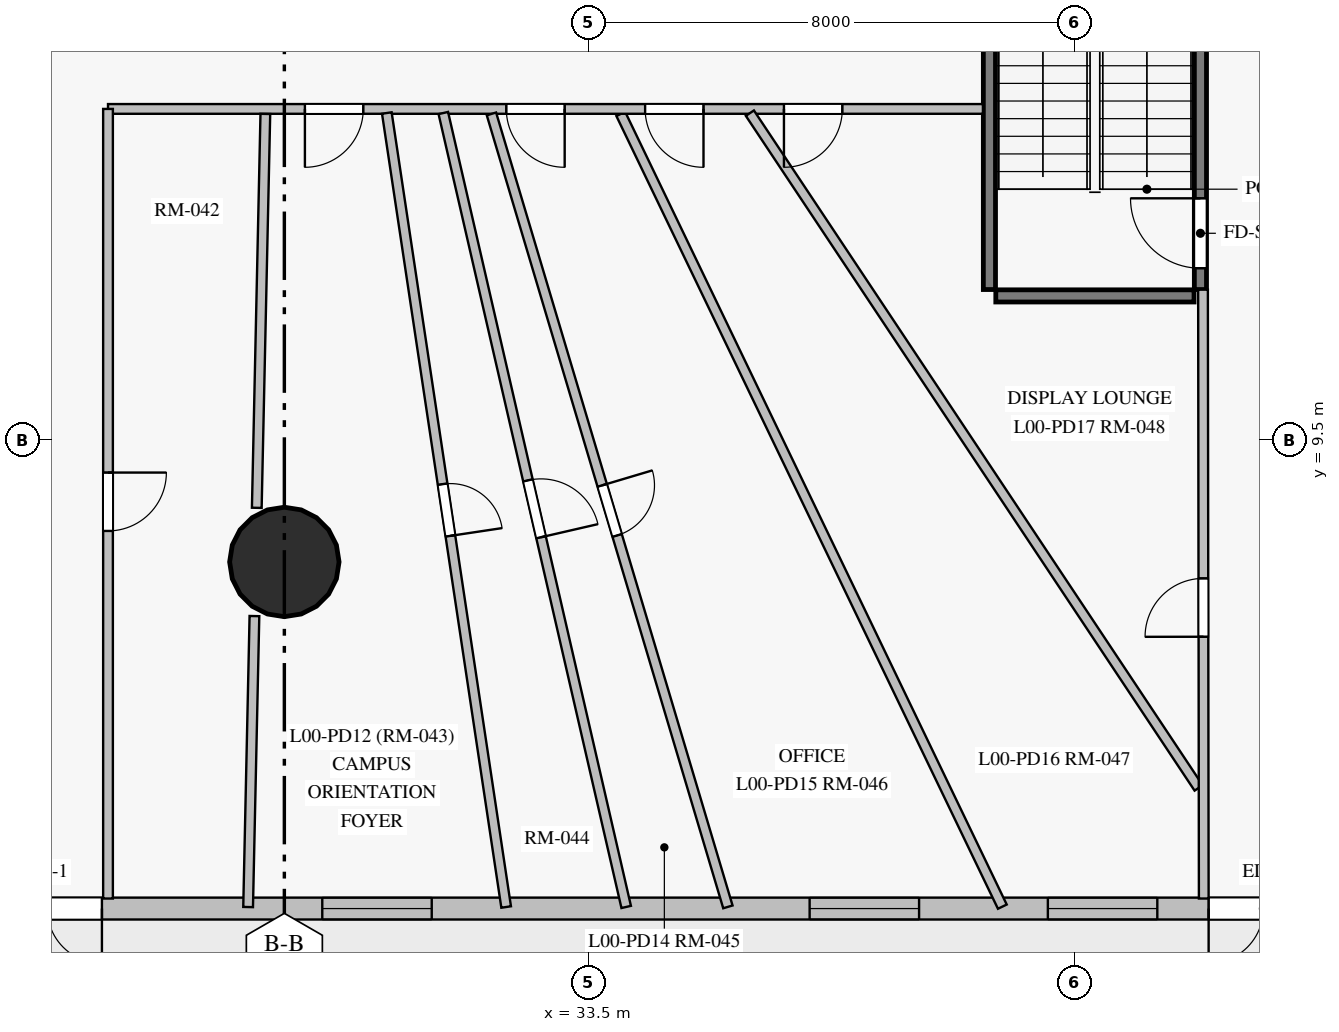
"""IFC4 building model, lengths in metres.
Left out: names, types, materials, properties, quantities, classifications, styles, units other than length and angle.
Written with IfcOpenShell. Run it as: python <this file> out.ifc"""

import sys

from ifc_helpers import new_model, si_unit, direction, frame, frame_2d, origin, origin_with_axes, origin_2d, place, context, subcontext, project, spatial, rectangle, circle, extrude, source, transform, mapped, element, fill, save


model = new_model("IFC4")
c1 = context("Model", 3, precision=1e-05, world=origin(), true_north=direction((0.0, 1.0)))
c2 = subcontext(c1, "Body", "Model", "MODEL_VIEW")
j1 = project(units=[si_unit("LENGTHUNIT", "METRE"), si_unit("PLANEANGLEUNIT", "RADIAN")], contexts=[c1])
p1 = place(None, origin())
s1 = spatial("IfcSite", under=j1, at=p1, CompositionType="ELEMENT")
p2 = place(p1, origin())
s2 = spatial("IfcBuilding", under=s1, at=p2, CompositionType="ELEMENT")
p3 = place(p2, origin())
s3 = spatial("IfcBuildingStorey", under=s2, at=p3, CompositionType="ELEMENT", Elevation=0.0)
m1 = source(origin_with_axes(), c2, "Body", "SweptSolid", [
    extrude(circle(Radius=0.9, at=origin_2d()), origin(), (0.0, 0.0, 1.0), 4.5),
])
p4 = place(p3, frame((28.5, 7.5, 0.0), z_axis=(0.0, 0.0, 1.0), x_axis=(1.0, 0.0, 0.0)))
e1 = element("IfcColumn", 1, at=p4, inside=s3, PredefinedType="COLUMN", context=c2, shape_type="MappedRepresentation", body=[
    mapped(m1, transform((0.0, 0.0, 0.0), scale=1.0)),
])
p5 = place(p3, frame((56.1, 1.8, 0.0), z_axis=(0.0, 0.0, 1.0), x_axis=(-1.0, 0.0, 0.0)))
e2 = element("IfcWall", 2, at=p5, inside=s3, PredefinedType="SOLIDWALL", context=c2, shape_type="SweptSolid", body=[
    extrude(rectangle(XDim=54.6, YDim=0.36, at=frame_2d((27.3, 0.0))), origin(), (0.0, 0.0, 1.0), 4.2),
])
p6 = place(p5, frame((51.547, 0.0, 0.85)))
e3 = element("IfcOpeningElement", 3, at=p6, cuts=e2, PredefinedType="OPENING", context=c2, shape_type="SweptSolid", body=[
    extrude(rectangle(XDim=1.8, YDim=2.2, at=frame_2d((0.9, 1.1))), frame((0.0, 0.19, 0.0), z_axis=(0.0, -1.0, 0.0), x_axis=(1.0, 0.0, 0.0)), (0.0, 0.0, 1.0), 0.38),
])
p7 = place(p5, frame((47.014, 0.0, 0.85)))
e4 = element("IfcOpeningElement", 4, at=p7, cuts=e2, PredefinedType="OPENING", context=c2, shape_type="SweptSolid", body=[
    extrude(rectangle(XDim=1.8, YDim=2.2, at=frame_2d((0.9, 1.1))), frame((0.0, 0.19, 0.0), z_axis=(0.0, -1.0, 0.0), x_axis=(1.0, 0.0, 0.0)), (0.0, 0.0, 1.0), 0.38),
])
p8 = place(p5, frame((42.49, 0.0, 0.85)))
e5 = element("IfcOpeningElement", 5, at=p8, cuts=e2, PredefinedType="OPENING", context=c2, shape_type="SweptSolid", body=[
    extrude(rectangle(XDim=1.8, YDim=2.2, at=frame_2d((0.9, 1.1))), frame((0.0, 0.19, 0.0), z_axis=(0.0, -1.0, 0.0), x_axis=(1.0, 0.0, 0.0)), (0.0, 0.0, 1.0), 0.38),
])
p9 = place(p5, frame((37.288, 0.0, 0.85)))
e6 = element("IfcOpeningElement", 6, at=p9, cuts=e2, PredefinedType="OPENING", context=c2, shape_type="SweptSolid", body=[
    extrude(rectangle(XDim=1.8, YDim=2.2, at=frame_2d((0.9, 1.1))), frame((0.0, 0.19, 0.0), z_axis=(0.0, -1.0, 0.0), x_axis=(1.0, 0.0, 0.0)), (0.0, 0.0, 1.0), 0.38),
])
p10 = place(p5, frame((25.176, 0.0, 0.85)))
e7 = element("IfcOpeningElement", 7, at=p10, cuts=e2, PredefinedType="OPENING", context=c2, shape_type="SweptSolid", body=[
    extrude(rectangle(XDim=1.8, YDim=2.2, at=frame_2d((0.9, 1.1))), frame((0.0, 0.19, 0.0), z_axis=(0.0, -1.0, 0.0), x_axis=(1.0, 0.0, 0.0)), (0.0, 0.0, 1.0), 0.38),
])
p11 = place(p5, frame((17.162, 0.0, 0.85)))
e8 = element("IfcOpeningElement", 8, at=p11, cuts=e2, PredefinedType="OPENING", context=c2, shape_type="SweptSolid", body=[
    extrude(rectangle(XDim=1.8, YDim=2.2, at=frame_2d((0.9, 1.1))), frame((0.0, 0.19, 0.0), z_axis=(0.0, -1.0, 0.0), x_axis=(1.0, 0.0, 0.0)), (0.0, 0.0, 1.0), 0.38),
])
p12 = place(p5, frame((13.244, 0.0, 0.85)))
e9 = element("IfcOpeningElement", 9, at=p12, cuts=e2, PredefinedType="OPENING", context=c2, shape_type="SweptSolid", body=[
    extrude(rectangle(XDim=1.8, YDim=2.2, at=frame_2d((0.9, 1.1))), frame((0.0, 0.19, 0.0), z_axis=(0.0, -1.0, 0.0), x_axis=(1.0, 0.0, 0.0)), (0.0, 0.0, 1.0), 0.38),
])
p13 = place(p5, frame((6.25, 0.0, 0.85)))
e10 = element("IfcOpeningElement", 10, at=p13, cuts=e2, PredefinedType="OPENING", context=c2, shape_type="SweptSolid", body=[
    extrude(rectangle(XDim=1.8, YDim=2.2, at=frame_2d((0.9, 1.1))), frame((0.0, 0.19, 0.0), z_axis=(0.0, -1.0, 0.0), x_axis=(1.0, 0.0, 0.0)), (0.0, 0.0, 1.0), 0.38),
])
p14 = place(p5, frame((1.48, 0.0, 0.85)))
e11 = element("IfcOpeningElement", 11, at=p14, cuts=e2, PredefinedType="OPENING", context=c2, shape_type="SweptSolid", body=[
    extrude(rectangle(XDim=1.8, YDim=2.2, at=frame_2d((0.9, 1.1))), frame((0.0, 0.19, 0.0), z_axis=(0.0, -1.0, 0.0), x_axis=(1.0, 0.0, 0.0)), (0.0, 0.0, 1.0), 0.38),
])
p15 = place(p5, frame((33.2, 0.0, 0.0)))
e12 = element("IfcOpeningElement", 12, at=p15, cuts=e2, PredefinedType="OPENING", context=c2, shape_type="SweptSolid", body=[
    extrude(rectangle(XDim=1.8, YDim=2.3, at=frame_2d((0.9, 1.15))), frame((0.0, 0.19, 0.0), z_axis=(0.0, -1.0, 0.0), x_axis=(1.0, 0.0, 0.0)), (0.0, 0.0, 1.0), 0.38),
])
p16 = place(p5, frame((30.6, 0.0, 0.0)))
e13 = element("IfcOpeningElement", 13, at=p16, cuts=e2, PredefinedType="OPENING", context=c2, shape_type="SweptSolid", body=[
    extrude(rectangle(XDim=1.8, YDim=2.3, at=frame_2d((0.9, 1.15))), frame((0.0, 0.19, 0.0), z_axis=(0.0, -1.0, 0.0), x_axis=(1.0, 0.0, 0.0)), (0.0, 0.0, 1.0), 0.38),
])
p17 = place(p5, frame((10.6, 0.0, 0.0)))
e14 = element("IfcOpeningElement", 14, at=p17, cuts=e2, PredefinedType="OPENING", context=c2, shape_type="SweptSolid", body=[
    extrude(rectangle(XDim=1.8, YDim=2.3, at=frame_2d((0.9, 1.15))), frame((0.0, 0.19, 0.0), z_axis=(0.0, -1.0, 0.0), x_axis=(1.0, 0.0, 0.0)), (0.0, 0.0, 1.0), 0.38),
])
p18 = place(p3, frame((40.095, 11.98, 0.0), z_axis=(0.0, 0.0, 1.0), x_axis=(0.0, 1.0, 0.0)))
e15 = element("IfcWall", 15, at=p18, inside=s3, PredefinedType="SHEAR", context=c2, shape_type="SweptSolid", body=[
    extrude(rectangle(XDim=7.35, YDim=0.2, at=frame_2d((3.675, 0.0))), origin(), (0.0, 0.0, 1.0), 4.2),
])
p19 = place(p3, frame((43.565, 11.98, 0.0), z_axis=(0.0, 0.0, 1.0), x_axis=(0.0, 1.0, 0.0)))
e16 = element("IfcWall", 16, at=p19, inside=s3, PredefinedType="SHEAR", context=c2, shape_type="SweptSolid", body=[
    extrude(rectangle(XDim=7.35, YDim=0.2, at=frame_2d((3.675, 0.0))), origin(), (0.0, 0.0, 1.0), 4.2),
])
p20 = place(p19, frame((0.35, 0.0, 0.0)))
e17 = element("IfcOpeningElement", 17, at=p20, cuts=e16, PredefinedType="OPENING", context=c2, shape_type="SweptSolid", body=[
    extrude(rectangle(XDim=1.15, YDim=2.15, at=frame_2d((0.575, 1.075))), frame((0.0, 0.11, 0.0), z_axis=(0.0, -1.0, 0.0), x_axis=(1.0, 0.0, 0.0)), (0.0, 0.0, 1.0), 0.22),
])
p21 = place(p3, frame((40.2, 11.875, 0.0), z_axis=(0.0, 0.0, 1.0), x_axis=(1.0, 0.0, 0.0)))
e18 = element("IfcWall", 18, at=p21, inside=s3, PredefinedType="SHEAR", context=c2, shape_type="SweptSolid", body=[
    extrude(rectangle(XDim=3.26, YDim=0.2, at=frame_2d((1.63, 0.0))), origin(), (0.0, 0.0, 1.0), 4.2),
])
p22 = place(p3, frame((40.932, 21.274, 0.0), z_axis=(0.0, 0.0, 1.0), x_axis=(0.923573591062, -0.383421206889, 0.0)))
e19 = element("IfcWall", 19, at=p22, inside=s3, PredefinedType="PARTITIONING", context=c2, shape_type="SweptSolid", body=[
    extrude(rectangle(XDim=17.149, YDim=0.16, at=frame_2d((8.574, 0.0))), origin(), (0.0, 0.0, 1.0), 4.2),
])
p23 = place(p22, frame((8.082, 0.0, 0.0)))
e20 = element("IfcOpeningElement", 20, at=p23, cuts=e19, PredefinedType="OPENING", context=c2, shape_type="SweptSolid", body=[
    extrude(rectangle(XDim=0.96, YDim=2.15, at=frame_2d((0.48, 1.075))), frame((0.0, 0.09, 0.0), z_axis=(0.0, -1.0, 0.0), x_axis=(1.0, 0.0, 0.0)), (0.0, 0.0, 1.0), 0.18),
])
p24 = place(p3, frame((34.032, 14.868, 0.0), z_axis=(0.0, 0.0, 1.0), x_axis=(0.433724291506, -0.901045636445, 0.0)))
e21 = element("IfcWall", 21, at=p24, inside=s3, PredefinedType="PARTITIONING", context=c2, shape_type="SweptSolid", body=[
    extrude(rectangle(XDim=14.468, YDim=0.16, at=frame_2d((7.234, 0.0))), origin(), (0.0, 0.0, 1.0), 4.2),
])
p25 = place(p3, frame((39.988, 14.95, 0.0), z_axis=(0.0, 0.0, 1.0), x_axis=(-1.0, 0.0, 0.0)))
e22 = element("IfcWall", 22, at=p25, inside=s3, PredefinedType="PARTITIONING", context=c2, shape_type="SweptSolid", body=[
    extrude(rectangle(XDim=14.388, YDim=0.16, at=frame_2d((7.194, 0.0))), origin(), (0.0, 0.0, 1.0), 4.2),
])
p26 = place(p25, frame((10.19, 0.0, 0.0)))
e23 = element("IfcOpeningElement", 23, at=p26, cuts=e22, PredefinedType="OPENING", context=c2, shape_type="SweptSolid", body=[
    extrude(rectangle(XDim=0.96, YDim=2.15, at=frame_2d((0.48, 1.075))), frame((0.0, 0.09, 0.0), z_axis=(0.0, -1.0, 0.0), x_axis=(1.0, 0.0, 0.0)), (0.0, 0.0, 1.0), 0.18),
])
p27 = place(p25, frame((6.878, 0.0, 0.0)))
e24 = element("IfcOpeningElement", 24, at=p27, cuts=e22, PredefinedType="OPENING", context=c2, shape_type="SweptSolid", body=[
    extrude(rectangle(XDim=0.96, YDim=2.15, at=frame_2d((0.48, 1.075))), frame((0.0, 0.09, 0.0), z_axis=(0.0, -1.0, 0.0), x_axis=(1.0, 0.0, 0.0)), (0.0, 0.0, 1.0), 0.18),
])
p28 = place(p25, frame((4.595, 0.0, 0.0)))
e25 = element("IfcOpeningElement", 25, at=p28, cuts=e22, PredefinedType="OPENING", context=c2, shape_type="SweptSolid", body=[
    extrude(rectangle(XDim=0.96, YDim=2.15, at=frame_2d((0.48, 1.075))), frame((0.0, 0.09, 0.0), z_axis=(0.0, -1.0, 0.0), x_axis=(1.0, 0.0, 0.0)), (0.0, 0.0, 1.0), 0.18),
])
p29 = place(p25, frame((2.312, 0.0, 0.0)))
e26 = element("IfcOpeningElement", 26, at=p29, cuts=e22, PredefinedType="OPENING", context=c2, shape_type="SweptSolid", body=[
    extrude(rectangle(XDim=0.96, YDim=2.15, at=frame_2d((0.48, 1.075))), frame((0.0, 0.09, 0.0), z_axis=(0.0, -1.0, 0.0), x_axis=(1.0, 0.0, 0.0)), (0.0, 0.0, 1.0), 0.18),
])
p30 = place(p3, frame((31.906, 14.868, 0.0), z_axis=(0.0, 0.0, 1.0), x_axis=(0.285757427195, -0.958301984138, 0.0)))
e27 = element("IfcWall", 27, at=p30, inside=s3, PredefinedType="PARTITIONING", context=c2, shape_type="SweptSolid", body=[
    extrude(rectangle(XDim=13.607, YDim=0.16, at=frame_2d((6.804, 0.0))), origin(), (0.0, 0.0, 1.0), 4.2),
])
p31 = place(p30, frame((6.374, 0.0, 0.0)))
e28 = element("IfcOpeningElement", 28, at=p31, cuts=e27, PredefinedType="OPENING", context=c2, shape_type="SweptSolid", body=[
    extrude(rectangle(XDim=0.86, YDim=2.04, at=frame_2d((0.43, 1.02))), frame((0.0, 0.09, 0.0), z_axis=(0.0, -1.0, 0.0), x_axis=(1.0, 0.0, 0.0)), (0.0, 0.0, 1.0), 0.18),
])
p32 = place(p3, frame((31.114, 14.883, 0.0), z_axis=(0.0, 0.0, 1.0), x_axis=(0.22446422468, -0.974482330183, 0.0)))
e29 = element("IfcWall", 29, at=p32, inside=s3, PredefinedType="PARTITIONING", context=c2, shape_type="SweptSolid", body=[
    extrude(rectangle(XDim=13.398, YDim=0.16, at=frame_2d((6.699, 0.0))), origin(), (0.0, 0.0, 1.0), 4.2),
])
p33 = place(p32, frame((6.199, 0.0, 0.0)))
e30 = element("IfcOpeningElement", 30, at=p33, cuts=e29, PredefinedType="OPENING", context=c2, shape_type="SweptSolid", body=[
    extrude(rectangle(XDim=0.96, YDim=2.15, at=frame_2d((0.48, 1.075))), frame((0.0, 0.09, 0.0), z_axis=(0.0, -1.0, 0.0), x_axis=(1.0, 0.0, 0.0)), (0.0, 0.0, 1.0), 0.18),
])
p34 = place(p3, frame((36.156, 14.881, 0.0), z_axis=(0.0, 0.0, 1.0), x_axis=(0.553761322164, -0.832675445822, 0.0)))
e31 = element("IfcWall", 31, at=p34, inside=s3, PredefinedType="PARTITIONING", context=c2, shape_type="SweptSolid", body=[
    extrude(rectangle(XDim=13.327, YDim=0.16, at=frame_2d((6.664, 0.0))), origin(), (0.0, 0.0, 1.0), 4.2),
])
p35 = place(p3, frame((30.185, 14.883, 0.0), z_axis=(0.0, 0.0, 1.0), x_axis=(0.148624355267, -0.988893725848, 0.0)))
e32 = element("IfcWall", 32, at=p35, inside=s3, PredefinedType="PARTITIONING", context=c2, shape_type="SweptSolid", body=[
    extrude(rectangle(XDim=13.204, YDim=0.16, at=frame_2d((6.602, 0.0))), origin(), (0.0, 0.0, 1.0), 4.2),
])
p36 = place(p35, frame((6.172, 0.0, 0.0)))
e33 = element("IfcOpeningElement", 33, at=p36, cuts=e32, PredefinedType="OPENING", context=c2, shape_type="SweptSolid", body=[
    extrude(rectangle(XDim=0.86, YDim=2.04, at=frame_2d((0.43, 1.02))), frame((0.0, 0.09, 0.0), z_axis=(0.0, -1.0, 0.0), x_axis=(1.0, 0.0, 0.0)), (0.0, 0.0, 1.0), 0.18),
])
p37 = place(p3, frame((25.6, 14.95, 0.0), z_axis=(0.0, 0.0, 1.0), x_axis=(0.0, -1.0, 0.0)))
e34 = element("IfcWall", 34, at=p37, inside=s3, PredefinedType="PARTITIONING", context=c2, shape_type="SweptSolid", body=[
    extrude(rectangle(XDim=12.985, YDim=0.16, at=frame_2d((6.492, 0.0))), origin(), (0.0, 0.0, 1.0), 4.2),
])
p38 = place(p37, frame((5.98, 0.0, 0.0)))
e35 = element("IfcOpeningElement", 35, at=p38, cuts=e34, PredefinedType="OPENING", context=c2, shape_type="SweptSolid", body=[
    extrude(rectangle(XDim=0.96, YDim=2.15, at=frame_2d((0.48, 1.075))), frame((0.0, 0.09, 0.0), z_axis=(0.0, -1.0, 0.0), x_axis=(1.0, 0.0, 0.0)), (0.0, 0.0, 1.0), 0.18),
])
p39 = place(p3, frame((43.62, 1.965, 0.0), z_axis=(0.0, 0.0, 1.0), x_axis=(-0.001219154463, 0.999999256831, 0.0)))
e36 = element("IfcWall", 36, at=p39, inside=s3, PredefinedType="PARTITIONING", context=c2, shape_type="SweptSolid", body=[
    extrude(rectangle(XDim=10.013, YDim=0.16, at=frame_2d((5.006, 0.0))), origin(), (0.0, 0.0, 1.0), 4.2),
])
p40 = place(p39, frame((4.305, 0.0, 0.0)))
e37 = element("IfcOpeningElement", 37, at=p40, cuts=e36, PredefinedType="OPENING", context=c2, shape_type="SweptSolid", body=[
    extrude(rectangle(XDim=0.96, YDim=2.15, at=frame_2d((0.48, 1.075))), frame((0.0, 0.09, 0.0), z_axis=(0.0, -1.0, 0.0), x_axis=(1.0, 0.0, 0.0)), (0.0, 0.0, 1.0), 0.18),
])
p41 = place(p3, frame((28.188, 14.868, 0.0), z_axis=(0.0, 0.0, 1.0), x_axis=(-0.021740545111, -0.999763646418, 0.0)))
e38 = element("IfcWall", 38, at=p41, inside=s3, PredefinedType="PARTITIONING", context=c2, shape_type="SweptSolid", body=[
    extrude(rectangle(XDim=6.479, YDim=0.16, at=frame_2d((3.24, 0.0))), origin(), (0.0, 0.0, 1.0), 3.25),
])
p42 = place(p3, frame((28.008, 6.61, 0.0), z_axis=(0.0, 0.0, 1.0), x_axis=(-0.021729561994, -0.999763885193, 0.0)))
e39 = element("IfcWall", 39, at=p42, inside=s3, PredefinedType="PARTITIONING", context=c2, shape_type="SweptSolid", body=[
    extrude(rectangle(XDim=4.786, YDim=0.16, at=frame_2d((2.393, 0.0))), origin(), (0.0, 0.0, 1.0), 4.2),
])
m2 = source(origin_with_axes(), c2, "Body", "SweptSolid", [
    extrude(rectangle(XDim=1.8, YDim=2.2, at=frame_2d((0.9, 1.1))), frame((0.0, 0.03, 0.0), z_axis=(0.0, -1.0, 0.0), x_axis=(1.0, 0.0, 0.0)), (0.0, 0.0, 1.0), 0.06),
])
p43 = place(p10, origin())
e40 = element("IfcWindow", 40, at=p43, inside=s3, PartitioningType="SINGLE_PANEL", PredefinedType="WINDOW", context=c2, shape_type="MappedRepresentation", body=[
    mapped(m2, transform((0.0, 0.0, 0.0), scale=1.0)),
])
fill(e7, e40)
p44 = place(p11, origin())
e41 = element("IfcWindow", 41, at=p44, inside=s3, PartitioningType="SINGLE_PANEL", PredefinedType="WINDOW", context=c2, shape_type="MappedRepresentation", body=[
    mapped(m2, transform((0.0, 0.0, 0.0), scale=1.0)),
])
fill(e8, e41)
p45 = place(p12, origin())
e42 = element("IfcWindow", 42, at=p45, inside=s3, PartitioningType="SINGLE_PANEL", PredefinedType="WINDOW", context=c2, shape_type="MappedRepresentation", body=[
    mapped(m2, transform((0.0, 0.0, 0.0), scale=1.0)),
])
fill(e9, e42)
m3 = source(origin_with_axes(), c2, "Body", "SweptSolid", [
    extrude(rectangle(XDim=1.8, YDim=2.3, at=frame_2d((0.9, 1.15))), frame((0.0, 0.025, 0.0), z_axis=(0.0, -1.0, 0.0), x_axis=(1.0, 0.0, 0.0)), (0.0, 0.0, 1.0), 0.05),
])
p46 = place(p16, origin())
e43 = element("IfcDoor", 43, at=p46, inside=s3, OperationType="DOUBLE_DOOR_SINGLE_SWING", PredefinedType="DOOR", context=c2, shape_type="MappedRepresentation", body=[
    mapped(m3, transform((0.0, 0.0, 0.0), scale=1.0)),
])
fill(e13, e43)
p47 = place(p17, origin())
e44 = element("IfcDoor", 44, at=p47, inside=s3, OperationType="DOUBLE_DOOR_SINGLE_SWING", PredefinedType="DOOR", context=c2, shape_type="MappedRepresentation", body=[
    mapped(m3, transform((0.0, 0.0, 0.0), scale=1.0)),
])
fill(e14, e44)
m4 = source(origin_with_axes(), c2, "Body", "SweptSolid", [
    extrude(rectangle(XDim=1.15, YDim=2.15, at=frame_2d((0.575, 1.075))), frame((0.0, 0.025, 0.0), z_axis=(0.0, -1.0, 0.0), x_axis=(1.0, 0.0, 0.0)), (0.0, 0.0, 1.0), 0.05),
])
p48 = place(p20, origin())
e45 = element("IfcDoor", 45, at=p48, inside=s3, OperationType="SINGLE_SWING_RIGHT", PredefinedType="DOOR", context=c2, shape_type="MappedRepresentation", body=[
    mapped(m4, transform((0.0, 0.0, 0.0), scale=1.0)),
])
fill(e17, e45)
m5 = source(origin_with_axes(), c2, "Body", "SweptSolid", [
    extrude(rectangle(XDim=0.96, YDim=2.15, at=frame_2d((0.48, 1.075))), frame((0.0, 0.025, 0.0), z_axis=(0.0, -1.0, 0.0), x_axis=(1.0, 0.0, 0.0)), (0.0, 0.0, 1.0), 0.05),
])
p49 = place(p38, origin())
e46 = element("IfcDoor", 46, at=p49, inside=s3, OperationType="SINGLE_SWING_LEFT", PredefinedType="DOOR", context=c2, shape_type="MappedRepresentation", body=[
    mapped(m5, transform((0.0, 0.0, 0.0), scale=1.0)),
])
fill(e35, e46)
p50 = place(p26, origin())
e47 = element("IfcDoor", 47, at=p50, inside=s3, OperationType="SINGLE_SWING_RIGHT", PredefinedType="DOOR", context=c2, shape_type="MappedRepresentation", body=[
    mapped(m5, transform((0.0, 0.0, 0.0), scale=1.0)),
])
fill(e23, e47)
p51 = place(p27, origin())
e48 = element("IfcDoor", 48, at=p51, inside=s3, OperationType="SINGLE_SWING_LEFT", PredefinedType="DOOR", context=c2, shape_type="MappedRepresentation", body=[
    mapped(m5, transform((0.0, 0.0, 0.0), scale=1.0)),
])
fill(e24, e48)
p52 = place(p33, origin())
e49 = element("IfcDoor", 49, at=p52, inside=s3, OperationType="SINGLE_SWING_RIGHT", PredefinedType="DOOR", context=c2, shape_type="MappedRepresentation", body=[
    mapped(m5, transform((0.0, 0.0, 0.0), scale=1.0)),
])
fill(e30, e49)
p53 = place(p28, origin())
e50 = element("IfcDoor", 50, at=p53, inside=s3, OperationType="SINGLE_SWING_LEFT", PredefinedType="DOOR", context=c2, shape_type="MappedRepresentation", body=[
    mapped(m5, transform((0.0, 0.0, 0.0), scale=1.0)),
])
fill(e25, e50)
p54 = place(p29, origin())
e51 = element("IfcDoor", 51, at=p54, inside=s3, OperationType="SINGLE_SWING_RIGHT", PredefinedType="DOOR", context=c2, shape_type="MappedRepresentation", body=[
    mapped(m5, transform((0.0, 0.0, 0.0), scale=1.0)),
])
fill(e26, e51)
p55 = place(p40, origin())
e52 = element("IfcDoor", 52, at=p55, inside=s3, OperationType="SINGLE_SWING_LEFT", PredefinedType="DOOR", context=c2, shape_type="MappedRepresentation", body=[
    mapped(m5, transform((0.0, 0.0, 0.0), scale=1.0)),
])
fill(e37, e52)
m6 = source(origin_with_axes(), c2, "Body", "SweptSolid", [
    extrude(rectangle(XDim=0.86, YDim=2.04, at=frame_2d((0.43, 1.02))), frame((0.0, 0.025, 0.0), z_axis=(0.0, -1.0, 0.0), x_axis=(1.0, 0.0, 0.0)), (0.0, 0.0, 1.0), 0.05),
])
p56 = place(p36, origin())
e53 = element("IfcDoor", 53, at=p56, inside=s3, OperationType="SINGLE_SWING_RIGHT", PredefinedType="DOOR", context=c2, shape_type="MappedRepresentation", body=[
    mapped(m6, transform((0.0, 0.0, 0.0), scale=1.0)),
])
fill(e33, e53)
p57 = place(p31, origin())
e54 = element("IfcDoor", 54, at=p57, inside=s3, OperationType="SINGLE_SWING_LEFT", PredefinedType="DOOR", context=c2, shape_type="MappedRepresentation", body=[
    mapped(m6, transform((0.0, 0.0, 0.0), scale=1.0)),
])
fill(e28, e54)
save(model, sys.argv[1])
